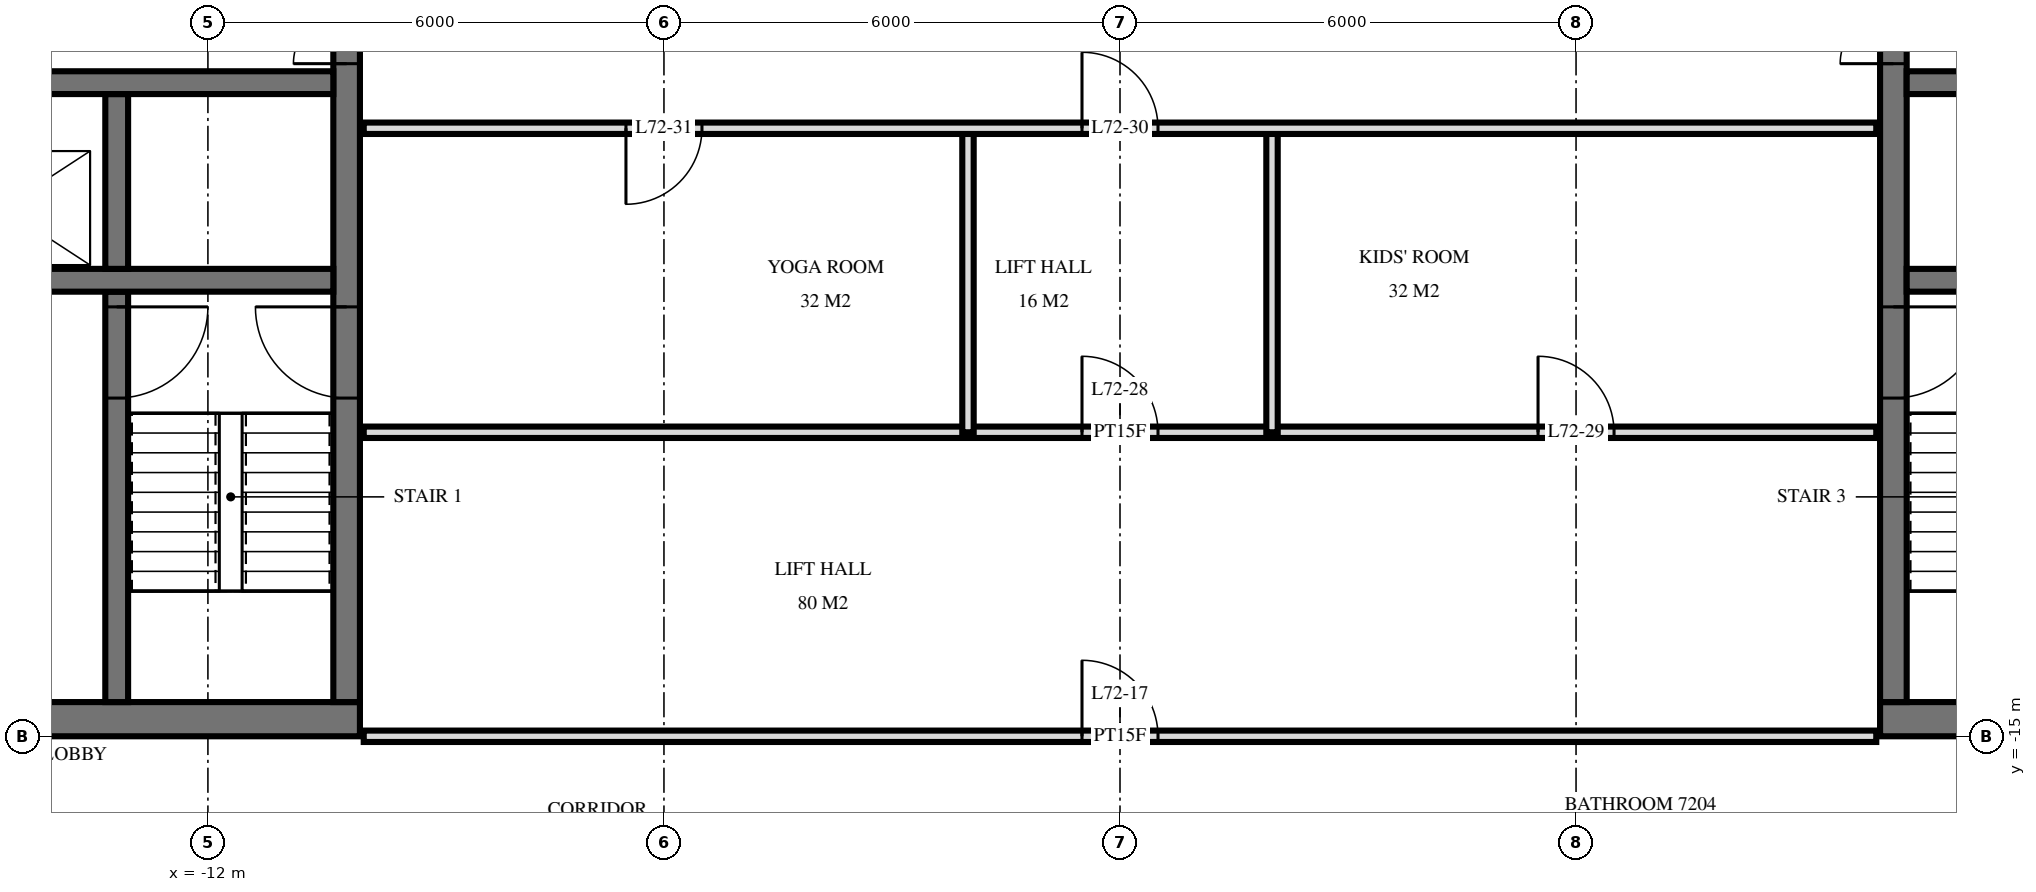
"""IFC4 building model, lengths in metres.
Left out: names, types, materials, properties, quantities, classifications, styles, units other than length and angle.
Written with IfcOpenShell. Run it as: python <this file> out.ifc"""

import sys

from ifc_helpers import new_model, si_unit, direction, frame, frame_2d, origin, place, context, subcontext, project, spatial, rectangle, extrude, element, fill, save


model = new_model("IFC4")
c1 = context("Model", 3, precision=1e-05, world=origin(), true_north=direction((0.0, 1.0)))
c2 = subcontext(c1, "Body", "Model", "MODEL_VIEW")
j1 = project(units=[si_unit("LENGTHUNIT", "METRE"), si_unit("PLANEANGLEUNIT", "RADIAN")], contexts=[c1])
p1 = place(None, origin())
s1 = spatial("IfcSite", under=j1, at=p1, CompositionType="ELEMENT")
p2 = place(p1, origin())
s2 = spatial("IfcBuilding", under=s1, at=p2, CompositionType="ELEMENT")
p3 = place(p2, frame((0.0, 0.0, 273.6)))
s3 = spatial("IfcBuildingStorey", under=s2, at=p3, CompositionType="ELEMENT", Elevation=273.6)
p4 = place(p3, frame((-19.5, -14.775, 0.0), z_axis=(0.0, 0.0, 1.0), x_axis=(1.0, 0.0, 0.0)))
e1 = element("IfcWall", 1, at=p4, inside=s3, PredefinedType="SHEAR", context=c2, shape_type="SweptSolid", body=[
    extrude(rectangle(XDim=9.5, YDim=0.45, at=frame_2d((4.75, 0.0))), origin(), (0.0, 0.0, 1.0), 3.5),
])
p5 = place(p4, frame((1.2, 0.0, 0.0)))
e2 = element("IfcOpeningElement", 2, at=p5, cuts=e1, PredefinedType="OPENING", context=c2, shape_type="SweptSolid", body=[
    extrude(rectangle(XDim=1.2, YDim=2.1, at=frame_2d((0.6, 1.05))), frame((0.0, 0.235, 0.0), z_axis=(0.0, -1.0, 0.0), x_axis=(1.0, 0.0, 0.0)), (0.0, 0.0, 1.0), 0.47),
])
p6 = place(p4, frame((4.25, 0.0, 0.0)))
e3 = element("IfcOpeningElement", 3, at=p6, cuts=e1, PredefinedType="OPENING", context=c2, shape_type="SweptSolid", body=[
    extrude(rectangle(XDim=1.1, YDim=2.1, at=frame_2d((0.55, 1.05))), frame((0.0, 0.235, 0.0), z_axis=(0.0, -1.0, 0.0), x_axis=(1.0, 0.0, 0.0)), (0.0, 0.0, 1.0), 0.47),
])
p7 = place(p3, frame((-10.175, -14.55, 0.0), z_axis=(0.0, 0.0, 1.0), x_axis=(0.0, 1.0, 0.0)))
e4 = element("IfcWall", 4, at=p7, inside=s3, PredefinedType="SHEAR", context=c2, shape_type="SweptSolid", body=[
    extrude(rectangle(XDim=14.1, YDim=0.35, at=frame_2d((7.05, 0.0))), origin(), (0.0, 0.0, 1.0), 3.5),
])
p8 = place(p7, frame((8.4, 0.0, 0.0)))
e5 = element("IfcOpeningElement", 5, at=p8, cuts=e4, PredefinedType="OPENING", context=c2, shape_type="SweptSolid", body=[
    extrude(rectangle(XDim=1.4, YDim=2.4, at=frame_2d((0.7, 1.2))), frame((0.0, 0.185, 0.0), z_axis=(0.0, -1.0, 0.0), x_axis=(1.0, 0.0, 0.0)), (0.0, 0.0, 1.0), 0.37),
])
p9 = place(p7, frame((10.0, 0.0, 0.0)))
e6 = element("IfcOpeningElement", 6, at=p9, cuts=e4, PredefinedType="OPENING", context=c2, shape_type="SweptSolid", body=[
    extrude(rectangle(XDim=1.4, YDim=2.4, at=frame_2d((0.7, 1.2))), frame((0.0, 0.185, 0.0), z_axis=(0.0, -1.0, 0.0), x_axis=(1.0, 0.0, 0.0)), (0.0, 0.0, 1.0), 0.37),
])
p10 = place(p7, frame((4.0, 0.0, 0.0)))
e7 = element("IfcOpeningElement", 7, at=p10, cuts=e4, PredefinedType="OPENING", context=c2, shape_type="SweptSolid", body=[
    extrude(rectangle(XDim=1.2, YDim=2.1, at=frame_2d((0.6, 1.05))), frame((0.0, 0.185, 0.0), z_axis=(0.0, -1.0, 0.0), x_axis=(1.0, 0.0, 0.0)), (0.0, 0.0, 1.0), 0.37),
])
p11 = place(p3, frame((-19.05, -6.4, 0.0), z_axis=(0.0, 0.0, 1.0), x_axis=(1.0, 0.0, 0.0)))
e8 = element("IfcWall", 8, at=p11, inside=s3, PredefinedType="SHEAR", context=c2, shape_type="SweptSolid", body=[
    extrude(rectangle(XDim=8.7, YDim=0.3, at=frame_2d((4.35, 0.0))), origin(), (0.0, 0.0, 1.0), 3.5),
])
p12 = place(p11, frame((0.8, 0.0, 0.0)))
e9 = element("IfcOpeningElement", 9, at=p12, cuts=e8, PredefinedType="OPENING", context=c2, shape_type="SweptSolid", body=[
    extrude(rectangle(XDim=1.1, YDim=2.1, at=frame_2d((0.55, 1.05))), frame((0.0, 0.16, 0.0), z_axis=(0.0, -1.0, 0.0), x_axis=(1.0, 0.0, 0.0)), (0.0, 0.0, 1.0), 0.32),
])
p13 = place(p3, frame((-19.05, -9.0, 0.0), z_axis=(0.0, 0.0, 1.0), x_axis=(1.0, 0.0, 0.0)))
e10 = element("IfcWall", 10, at=p13, inside=s3, PredefinedType="SHEAR", context=c2, shape_type="SweptSolid", body=[
    extrude(rectangle(XDim=8.7, YDim=0.3, at=frame_2d((4.35, 0.0))), origin(), (0.0, 0.0, 1.0), 3.5),
])
p14 = place(p13, frame((3.8, 0.0, 0.0)))
e11 = element("IfcOpeningElement", 11, at=p14, cuts=e10, PredefinedType="OPENING", context=c2, shape_type="SweptSolid", body=[
    extrude(rectangle(XDim=1.1, YDim=2.1, at=frame_2d((0.55, 1.05))), frame((0.0, 0.16, 0.0), z_axis=(0.0, -1.0, 0.0), x_axis=(1.0, 0.0, 0.0)), (0.0, 0.0, 1.0), 0.32),
])
p15 = place(p3, frame((-13.2, -8.85, 0.0), z_axis=(0.0, 0.0, 1.0), x_axis=(0.0, 1.0, 0.0)))
e12 = element("IfcWall", 12, at=p15, inside=s3, PredefinedType="SHEAR", context=c2, shape_type="SweptSolid", body=[
    extrude(rectangle(XDim=2.3, YDim=0.3, at=frame_2d((1.15, 0.0))), origin(), (0.0, 0.0, 1.0), 3.5),
])
p16 = place(p3, frame((-13.2, -14.55, 0.0), z_axis=(0.0, 0.0, 1.0), x_axis=(0.0, 1.0, 0.0)))
e13 = element("IfcWall", 13, at=p16, inside=s3, PredefinedType="SHEAR", context=c2, shape_type="SweptSolid", body=[
    extrude(rectangle(XDim=5.4, YDim=0.3, at=frame_2d((2.7, 0.0))), origin(), (0.0, 0.0, 1.0), 3.5),
])
p17 = place(p16, frame((4.0, 0.0, 0.0)))
e14 = element("IfcOpeningElement", 14, at=p17, cuts=e13, PredefinedType="OPENING", context=c2, shape_type="SweptSolid", body=[
    extrude(rectangle(XDim=1.2, YDim=2.1, at=frame_2d((0.6, 1.05))), frame((0.0, 0.16, 0.0), z_axis=(0.0, -1.0, 0.0), x_axis=(1.0, 0.0, 0.0)), (0.0, 0.0, 1.0), 0.32),
])
p18 = place(p3, frame((10.0, -14.775, 0.0), z_axis=(0.0, 0.0, 1.0), x_axis=(1.0, 0.0, 0.0)))
e15 = element("IfcWall", 15, at=p18, inside=s3, PredefinedType="SHEAR", context=c2, shape_type="SweptSolid", body=[
    extrude(rectangle(XDim=9.5, YDim=0.45, at=frame_2d((4.75, 0.0))), origin(), (0.0, 0.0, 1.0), 3.5),
])
p19 = place(p18, frame((7.1, 0.0, 0.0)))
e16 = element("IfcOpeningElement", 16, at=p19, cuts=e15, PredefinedType="OPENING", context=c2, shape_type="SweptSolid", body=[
    extrude(rectangle(XDim=1.2, YDim=2.1, at=frame_2d((0.6, 1.05))), frame((0.0, 0.235, 0.0), z_axis=(0.0, -1.0, 0.0), x_axis=(1.0, 0.0, 0.0)), (0.0, 0.0, 1.0), 0.47),
])
p20 = place(p18, frame((4.15, 0.0, 0.0)))
e17 = element("IfcOpeningElement", 17, at=p20, cuts=e15, PredefinedType="OPENING", context=c2, shape_type="SweptSolid", body=[
    extrude(rectangle(XDim=1.1, YDim=2.1, at=frame_2d((0.55, 1.05))), frame((0.0, 0.235, 0.0), z_axis=(0.0, -1.0, 0.0), x_axis=(1.0, 0.0, 0.0)), (0.0, 0.0, 1.0), 0.47),
])
p21 = place(p3, frame((10.175, -14.55, 0.0), z_axis=(0.0, 0.0, 1.0), x_axis=(0.0, 1.0, 0.0)))
e18 = element("IfcWall", 18, at=p21, inside=s3, PredefinedType="SHEAR", context=c2, shape_type="SweptSolid", body=[
    extrude(rectangle(XDim=14.1, YDim=0.35, at=frame_2d((7.05, 0.0))), origin(), (0.0, 0.0, 1.0), 3.5),
])
p22 = place(p21, frame((8.4, 0.0, 0.0)))
e19 = element("IfcOpeningElement", 19, at=p22, cuts=e18, PredefinedType="OPENING", context=c2, shape_type="SweptSolid", body=[
    extrude(rectangle(XDim=1.4, YDim=2.4, at=frame_2d((0.7, 1.2))), frame((0.0, 0.185, 0.0), z_axis=(0.0, -1.0, 0.0), x_axis=(1.0, 0.0, 0.0)), (0.0, 0.0, 1.0), 0.37),
])
p23 = place(p21, frame((10.0, 0.0, 0.0)))
e20 = element("IfcOpeningElement", 20, at=p23, cuts=e18, PredefinedType="OPENING", context=c2, shape_type="SweptSolid", body=[
    extrude(rectangle(XDim=1.4, YDim=2.4, at=frame_2d((0.7, 1.2))), frame((0.0, 0.185, 0.0), z_axis=(0.0, -1.0, 0.0), x_axis=(1.0, 0.0, 0.0)), (0.0, 0.0, 1.0), 0.37),
])
p24 = place(p21, frame((4.0, 0.0, 0.0)))
e21 = element("IfcOpeningElement", 21, at=p24, cuts=e18, PredefinedType="OPENING", context=c2, shape_type="SweptSolid", body=[
    extrude(rectangle(XDim=1.2, YDim=2.1, at=frame_2d((0.6, 1.05))), frame((0.0, 0.185, 0.0), z_axis=(0.0, -1.0, 0.0), x_axis=(1.0, 0.0, 0.0)), (0.0, 0.0, 1.0), 0.37),
])
p25 = place(p3, frame((10.35, -6.4, 0.0), z_axis=(0.0, 0.0, 1.0), x_axis=(1.0, 0.0, 0.0)))
e22 = element("IfcWall", 22, at=p25, inside=s3, PredefinedType="SHEAR", context=c2, shape_type="SweptSolid", body=[
    extrude(rectangle(XDim=8.7, YDim=0.3, at=frame_2d((4.35, 0.0))), origin(), (0.0, 0.0, 1.0), 3.5),
])
p26 = place(p25, frame((6.8, 0.0, 0.0)))
e23 = element("IfcOpeningElement", 23, at=p26, cuts=e22, PredefinedType="OPENING", context=c2, shape_type="SweptSolid", body=[
    extrude(rectangle(XDim=1.1, YDim=2.1, at=frame_2d((0.55, 1.05))), frame((0.0, 0.16, 0.0), z_axis=(0.0, -1.0, 0.0), x_axis=(1.0, 0.0, 0.0)), (0.0, 0.0, 1.0), 0.32),
])
p27 = place(p3, frame((10.35, -9.0, 0.0), z_axis=(0.0, 0.0, 1.0), x_axis=(1.0, 0.0, 0.0)))
e24 = element("IfcWall", 24, at=p27, inside=s3, PredefinedType="SHEAR", context=c2, shape_type="SweptSolid", body=[
    extrude(rectangle(XDim=8.7, YDim=0.3, at=frame_2d((4.35, 0.0))), origin(), (0.0, 0.0, 1.0), 3.5),
])
p28 = place(p27, frame((3.8, 0.0, 0.0)))
e25 = element("IfcOpeningElement", 25, at=p28, cuts=e24, PredefinedType="OPENING", context=c2, shape_type="SweptSolid", body=[
    extrude(rectangle(XDim=1.1, YDim=2.1, at=frame_2d((0.55, 1.05))), frame((0.0, 0.16, 0.0), z_axis=(0.0, -1.0, 0.0), x_axis=(1.0, 0.0, 0.0)), (0.0, 0.0, 1.0), 0.32),
])
for number, where, z_axis, x_axis in (
    (26, (2.0, -11.0, 0.0), (0.0, 0.0, 1.0), (0.0, 1.0, 0.0)),
    (27, (-2.0, -11.0, 0.0), (0.0, 0.0, 1.0), (0.0, 1.0, 0.0)),
):
    element("IfcWall", number, at=place(p3, frame(where, z_axis=z_axis, x_axis=x_axis)), inside=s3, PredefinedType="PARTITIONING", context=c2, shape_type="SweptSolid", body=[
        extrude(rectangle(XDim=4.0, YDim=0.15, at=frame_2d((2.0, 0.0))), origin(), (0.0, 0.0, 1.0), 3.22),
    ])
p29 = place(p3, frame((-9.95, -15.0, 0.0), z_axis=(0.0, 0.0, 1.0), x_axis=(1.0, 0.0, 0.0)))
e28 = element("IfcWall", 28, at=p29, inside=s3, PredefinedType="PARTITIONING", context=c2, shape_type="SweptSolid", body=[
    extrude(rectangle(XDim=19.9, YDim=0.15, at=frame_2d((9.95, 0.0))), origin(), (0.0, 0.0, 1.0), 2.584),
])
p30 = place(p29, frame((9.45, 0.0, 0.0)))
e29 = element("IfcOpeningElement", 29, at=p30, cuts=e28, PredefinedType="OPENING", context=c2, shape_type="SweptSolid", body=[
    extrude(rectangle(XDim=1.0, YDim=2.1, at=frame_2d((0.5, 1.05))), frame((0.0, 0.085, 0.0), z_axis=(0.0, -1.0, 0.0), x_axis=(1.0, 0.0, 0.0)), (0.0, 0.0, 1.0), 0.17),
])
p31 = place(p3, frame((-9.95, -11.0, 0.0), z_axis=(0.0, 0.0, 1.0), x_axis=(1.0, 0.0, 0.0)))
e30 = element("IfcWall", 30, at=p31, inside=s3, PredefinedType="PARTITIONING", context=c2, shape_type="SweptSolid", body=[
    extrude(rectangle(XDim=19.9, YDim=0.15, at=frame_2d((9.95, 0.0))), origin(), (0.0, 0.0, 1.0), 3.22),
])
p32 = place(p31, frame((9.45, 0.0, 0.0)))
e31 = element("IfcOpeningElement", 31, at=p32, cuts=e30, PredefinedType="OPENING", context=c2, shape_type="SweptSolid", body=[
    extrude(rectangle(XDim=1.0, YDim=2.1, at=frame_2d((0.5, 1.05))), frame((0.0, 0.085, 0.0), z_axis=(0.0, -1.0, 0.0), x_axis=(1.0, 0.0, 0.0)), (0.0, 0.0, 1.0), 0.17),
])
p33 = place(p31, frame((15.45, 0.0, 0.0)))
e32 = element("IfcOpeningElement", 32, at=p33, cuts=e30, PredefinedType="OPENING", context=c2, shape_type="SweptSolid", body=[
    extrude(rectangle(XDim=1.0, YDim=2.1, at=frame_2d((0.5, 1.05))), frame((0.0, 0.085, 0.0), z_axis=(0.0, -1.0, 0.0), x_axis=(1.0, 0.0, 0.0)), (0.0, 0.0, 1.0), 0.17),
])
p34 = place(p3, frame((-9.95, -7.0, 0.0), z_axis=(0.0, 0.0, 1.0), x_axis=(1.0, 0.0, 0.0)))
e33 = element("IfcWall", 33, at=p34, inside=s3, PredefinedType="PARTITIONING", context=c2, shape_type="SweptSolid", body=[
    extrude(rectangle(XDim=19.9, YDim=0.15, at=frame_2d((9.95, 0.0))), origin(), (0.0, 0.0, 1.0), 3.22),
])
p35 = place(p34, frame((9.45, 0.0, 0.0)))
e34 = element("IfcOpeningElement", 34, at=p35, cuts=e33, PredefinedType="OPENING", context=c2, shape_type="SweptSolid", body=[
    extrude(rectangle(XDim=1.0, YDim=2.1, at=frame_2d((0.5, 1.05))), frame((0.0, 0.085, 0.0), z_axis=(0.0, -1.0, 0.0), x_axis=(1.0, 0.0, 0.0)), (0.0, 0.0, 1.0), 0.17),
])
p36 = place(p34, frame((3.45, 0.0, 0.0)))
e35 = element("IfcOpeningElement", 35, at=p36, cuts=e33, PredefinedType="OPENING", context=c2, shape_type="SweptSolid", body=[
    extrude(rectangle(XDim=1.0, YDim=2.1, at=frame_2d((0.5, 1.05))), frame((0.0, 0.085, 0.0), z_axis=(0.0, -1.0, 0.0), x_axis=(1.0, 0.0, 0.0)), (0.0, 0.0, 1.0), 0.17),
])
p37 = place(p8, origin())
e36 = element("IfcDoor", 36, at=p37, inside=s3, OperationType="DOUBLE_DOOR_SINGLE_SWING", PredefinedType="DOOR", context=c2, shape_type="SweptSolid", body=[
    extrude(rectangle(XDim=1.4, YDim=2.4, at=frame_2d((0.7, 1.2))), frame((0.0, 0.025, 0.0), z_axis=(0.0, -1.0, 0.0), x_axis=(1.0, 0.0, 0.0)), (0.0, 0.0, 1.0), 0.05),
])
fill(e5, e36)
p38 = place(p10, origin())
e37 = element("IfcDoor", 37, at=p38, inside=s3, OperationType="SINGLE_SWING_LEFT", PredefinedType="DOOR", context=c2, shape_type="SweptSolid", body=[
    extrude(rectangle(XDim=1.2, YDim=2.1, at=frame_2d((0.6, 1.05))), frame((0.0, 0.025, 0.0), z_axis=(0.0, -1.0, 0.0), x_axis=(1.0, 0.0, 0.0)), (0.0, 0.0, 1.0), 0.05),
])
fill(e7, e37)
p39 = place(p17, frame((0.6, 0.0, 0.0), z_axis=(0.0, 0.0, 1.0), x_axis=(-1.0, 0.0, 0.0)))
e38 = element("IfcDoor", 38, at=p39, inside=s3, OperationType="SINGLE_SWING_RIGHT", PredefinedType="DOOR", context=c2, shape_type="SweptSolid", body=[
    extrude(rectangle(XDim=1.2, YDim=2.1, at=frame_2d((0.0, 1.05))), frame((0.0, -0.025, 0.0), z_axis=(0.0, 1.0, 0.0), x_axis=(-1.0, 0.0, 0.0)), (0.0, 0.0, 1.0), 0.05),
])
fill(e14, e38)
p40 = place(p22, origin())
e39 = element("IfcDoor", 39, at=p40, inside=s3, OperationType="DOUBLE_DOOR_SINGLE_SWING", PredefinedType="DOOR", context=c2, shape_type="SweptSolid", body=[
    extrude(rectangle(XDim=1.4, YDim=2.4, at=frame_2d((0.7, 1.2))), frame((0.0, 0.025, 0.0), z_axis=(0.0, -1.0, 0.0), x_axis=(1.0, 0.0, 0.0)), (0.0, 0.0, 1.0), 0.05),
])
fill(e19, e39)
p41 = place(p24, frame((0.6, 0.0, 0.0), z_axis=(0.0, 0.0, 1.0), x_axis=(-1.0, 0.0, 0.0)))
e40 = element("IfcDoor", 40, at=p41, inside=s3, OperationType="SINGLE_SWING_RIGHT", PredefinedType="DOOR", context=c2, shape_type="SweptSolid", body=[
    extrude(rectangle(XDim=1.2, YDim=2.1, at=frame_2d((0.0, 1.05))), frame((0.0, -0.025, 0.0), z_axis=(0.0, 1.0, 0.0), x_axis=(-1.0, 0.0, 0.0)), (0.0, 0.0, 1.0), 0.05),
])
fill(e21, e40)
p42 = place(p30, origin())
e41 = element("IfcDoor", 41, at=p42, inside=s3, OperationType="SINGLE_SWING_RIGHT", PredefinedType="DOOR", context=c2, shape_type="SweptSolid", body=[
    extrude(rectangle(XDim=1.0, YDim=2.1, at=frame_2d((0.5, 1.05))), frame((0.0, 0.025, 0.0), z_axis=(0.0, -1.0, 0.0), x_axis=(1.0, 0.0, 0.0)), (0.0, 0.0, 1.0), 0.05),
])
fill(e29, e41)
p43 = place(p32, origin())
e42 = element("IfcDoor", 42, at=p43, inside=s3, OperationType="SINGLE_SWING_RIGHT", PredefinedType="DOOR", context=c2, shape_type="SweptSolid", body=[
    extrude(rectangle(XDim=1.0, YDim=2.1, at=frame_2d((0.5, 1.05))), frame((0.0, 0.025, 0.0), z_axis=(0.0, -1.0, 0.0), x_axis=(1.0, 0.0, 0.0)), (0.0, 0.0, 1.0), 0.05),
])
fill(e31, e42)
p44 = place(p33, origin())
e43 = element("IfcDoor", 43, at=p44, inside=s3, OperationType="SINGLE_SWING_RIGHT", PredefinedType="DOOR", context=c2, shape_type="SweptSolid", body=[
    extrude(rectangle(XDim=1.0, YDim=2.1, at=frame_2d((0.5, 1.05))), frame((0.0, 0.025, 0.0), z_axis=(0.0, -1.0, 0.0), x_axis=(1.0, 0.0, 0.0)), (0.0, 0.0, 1.0), 0.05),
])
fill(e32, e43)
p45 = place(p35, origin())
e44 = element("IfcDoor", 44, at=p45, inside=s3, OperationType="SINGLE_SWING_RIGHT", PredefinedType="DOOR", context=c2, shape_type="SweptSolid", body=[
    extrude(rectangle(XDim=1.0, YDim=2.1, at=frame_2d((0.5, 1.05))), frame((0.0, 0.025, 0.0), z_axis=(0.0, -1.0, 0.0), x_axis=(1.0, 0.0, 0.0)), (0.0, 0.0, 1.0), 0.05),
])
fill(e34, e44)
p46 = place(p36, frame((0.5, 0.0, 0.0), z_axis=(0.0, 0.0, 1.0), x_axis=(-1.0, 0.0, 0.0)))
e45 = element("IfcDoor", 45, at=p46, inside=s3, OperationType="SINGLE_SWING_LEFT", PredefinedType="DOOR", context=c2, shape_type="SweptSolid", body=[
    extrude(rectangle(XDim=1.0, YDim=2.1, at=frame_2d((0.0, 1.05))), frame((0.0, -0.025, 0.0), z_axis=(0.0, 1.0, 0.0), x_axis=(-1.0, 0.0, 0.0)), (0.0, 0.0, 1.0), 0.05),
])
fill(e35, e45)
save(model, sys.argv[1])
